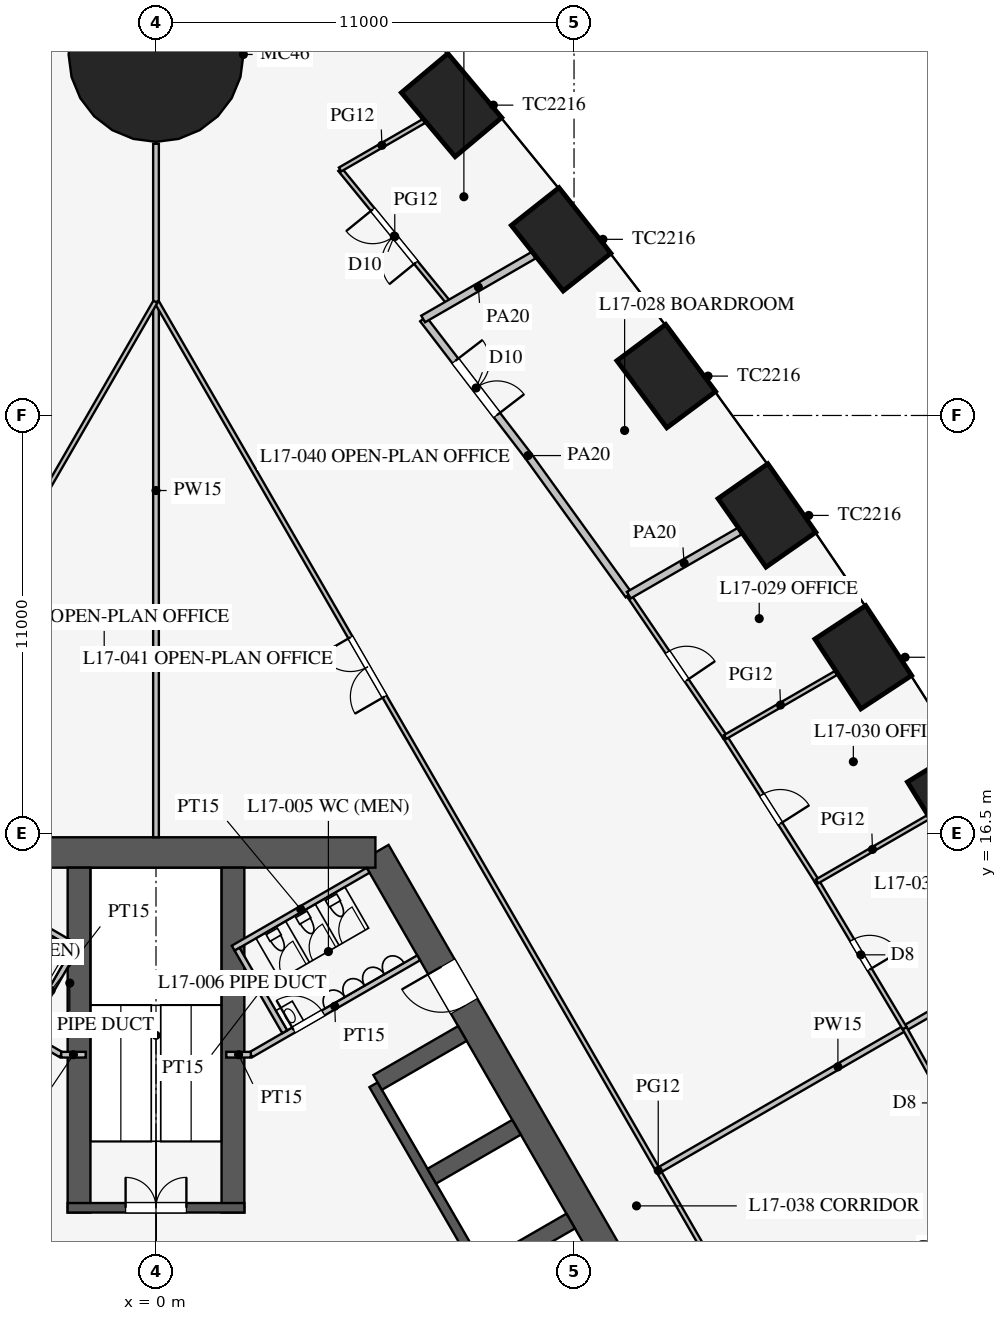
"""IFC4 building model, lengths in metres.
Left out: names, types, materials, properties, quantities, classifications, styles, units other than length and angle.
Written with IfcOpenShell. Run it as: python <this file> out.ifc"""

import sys

from ifc_helpers import new_model, si_unit, direction, frame, frame_2d, origin, origin_2d, place, context, subcontext, project, spatial, rectangle, circle, extrude, element, fill, save


model = new_model("IFC4")
c1 = context("Model", 3, precision=1e-05, world=origin(), true_north=direction((0.0, 1.0)))
c2 = subcontext(c1, "Body", "Model", "MODEL_VIEW")
j1 = project(units=[si_unit("LENGTHUNIT", "METRE"), si_unit("PLANEANGLEUNIT", "RADIAN")], contexts=[c1])
p1 = place(None, origin())
s1 = spatial("IfcSite", under=j1, at=p1, CompositionType="ELEMENT")
p2 = place(p1, origin())
s2 = spatial("IfcBuilding", under=s1, at=p2, CompositionType="ELEMENT")
p3 = place(p2, frame((0.0, 0.0, 75.3)))
s3 = spatial("IfcBuildingStorey", under=s2, at=p3, CompositionType="ELEMENT", Elevation=75.3)
for number, where, z_axis, x_axis in (
    (1, (21.031, 17.339, 0.0), (0.0, 0.0, 1.0), (-0.525, 0.851, 0.0)),
    (2, (18.611, 21.137, 0.0), (0.0, 0.0, 1.0), (-0.549, 0.836, 0.0)),
    (3, (16.076, 24.87, 0.0), (0.0, 0.0, 1.0), (-0.574, 0.819, 0.0)),
    (4, (13.426, 28.536, 0.0), (0.0, 0.0, 1.0), (-0.597, 0.802, 0.0)),
    (5, (10.66, 32.135, 0.0), (0.0, 0.0, 1.0), (-0.62, 0.784, 0.0)),
    (6, (7.776, 35.667, 0.0), (0.0, 0.0, 1.0), (-0.643, 0.766, 0.0)),
):
    element("IfcColumn", number, at=place(p3, frame(where, z_axis=z_axis, x_axis=x_axis)), inside=s3, PredefinedType="COLUMN", context=c2, shape_type="SweptSolid", body=[
        extrude(rectangle(XDim=2.2, YDim=1.6, at=origin_2d()), origin(), (0.0, 0.0, 1.0), 4.2),
    ])
p4 = place(p3, frame((0.0, 37.0, 0.0), z_axis=(0.0, 0.0, 1.0), x_axis=(1.0, 0.0, 0.0)))
e7 = element("IfcColumn", 7, at=p4, inside=s3, PredefinedType="COLUMN", context=c2, shape_type="SweptSolid", body=[
    extrude(circle(Radius=2.3, at=origin_2d()), origin(), (0.0, 0.0, 1.0), 4.2),
])
p5 = place(p3, frame((16.743, -3.0, 0.0), z_axis=(0.0, 0.0, 1.0), x_axis=(-0.500002442456, 0.866023993627, 0.0)))
e8 = element("IfcWall", 8, at=p5, inside=s3, PredefinedType="SHEAR", context=c2, shape_type="SweptSolid", body=[
    extrude(rectangle(XDim=21.939, YDim=0.8, at=frame_2d((10.97, 0.0))), origin(), (0.0, 0.0, 1.0), 4.2),
])
p6 = place(p5, frame((17.27, 0.0, 0.0)))
e9 = element("IfcOpeningElement", 9, at=p6, cuts=e8, PredefinedType="OPENING", context=c2, shape_type="SweptSolid", body=[
    extrude(rectangle(XDim=1.2, YDim=2.1, at=frame_2d((0.6, 1.05))), frame((0.0, 0.41, 0.0), z_axis=(0.0, -1.0, 0.0), x_axis=(1.0, 0.0, 0.0)), (0.0, 0.0, 1.0), 0.82),
])
p7 = place(p5, frame((3.47, 0.0, 0.0)))
e10 = element("IfcOpeningElement", 10, at=p7, cuts=e8, PredefinedType="OPENING", context=c2, shape_type="SweptSolid", body=[
    extrude(rectangle(XDim=1.2, YDim=2.1, at=frame_2d((0.6, 1.05))), frame((0.0, 0.41, 0.0), z_axis=(0.0, -1.0, 0.0), x_axis=(1.0, 0.0, 0.0)), (0.0, 0.0, 1.0), 0.82),
])
p8 = place(p3, frame((5.773, 16.0, 0.0), z_axis=(0.0, 0.0, 1.0), x_axis=(-1.0, 0.0, 0.0)))
e11 = element("IfcWall", 11, at=p8, inside=s3, PredefinedType="SHEAR", context=c2, shape_type="SweptSolid", body=[
    extrude(rectangle(XDim=11.547, YDim=0.8, at=frame_2d((5.773, 0.0))), origin(), (0.0, 0.0, 1.0), 4.2),
])
p9 = place(p3, frame((11.424, 0.014, 0.0), z_axis=(0.0, 0.0, 1.0), x_axis=(-0.500001763848, 0.866024385424, 0.0)))
e12 = element("IfcWall", 12, at=p9, inside=s3, PredefinedType="SHEAR", context=c2, shape_type="SweptSolid", body=[
    extrude(rectangle(XDim=11.4, YDim=0.25, at=frame_2d((5.7, 0.0))), origin(), (0.0, 0.0, 1.0), 4.2),
])
for number, where, z_axis, x_axis in (
    (13, (8.682, 5.012, 0.0), (0.0, 0.0, 1.0), (0.866, 0.5, 0.0)),
    (14, (7.257, 7.481, 0.0), (0.0, 0.0, 1.0), (0.866, 0.5, 0.0)),
):
    element("IfcWall", number, at=place(p3, frame(where, z_axis=z_axis, x_axis=x_axis)), inside=s3, PredefinedType="SHEAR", context=c2, shape_type="SweptSolid", body=[
        extrude(rectangle(XDim=2.575, YDim=0.45, at=frame_2d((1.288, 0.0))), origin(), (0.0, 0.0, 1.0), 4.2),
    ])
p10 = place(p3, frame((5.832, 9.949, 0.0), z_axis=(0.0, 0.0, 1.0), x_axis=(0.866029291668, 0.499993265928, 0.0)))
e15 = element("IfcWall", 15, at=p10, inside=s3, PredefinedType="SHEAR", context=c2, shape_type="SweptSolid", body=[
    extrude(rectangle(XDim=2.575, YDim=0.45, at=frame_2d((1.288, 0.0))), origin(), (0.0, 0.0, 1.0), 4.2),
])
for number, where, z_axis, x_axis in (
    (16, (2.025, 6.525, 0.0), (0.0, 0.0, 1.0), (0.0, 1.0, 0.0)),
    (17, (-2.025, 6.525, 0.0), (0.0, 0.0, 1.0), (0.0, 1.0, 0.0)),
):
    element("IfcWall", number, at=place(p3, frame(where, z_axis=z_axis, x_axis=x_axis)), inside=s3, PredefinedType="SHEAR", context=c2, shape_type="SweptSolid", body=[
        extrude(rectangle(XDim=9.075, YDim=0.6, at=frame_2d((4.538, 0.0))), origin(), (0.0, 0.0, 1.0), 4.2),
    ])
p11 = place(p3, frame((2.325, 6.65, 0.0), z_axis=(0.0, 0.0, 1.0), x_axis=(-1.0, 0.0, 0.0)))
e18 = element("IfcWall", 18, at=p11, inside=s3, PredefinedType="SHEAR", context=c2, shape_type="SweptSolid", body=[
    extrude(rectangle(XDim=4.65, YDim=0.25, at=frame_2d((2.325, 0.0))), origin(), (0.0, 0.0, 1.0), 4.2),
])
p12 = place(p11, frame((1.525, 0.0, 0.0)))
e19 = element("IfcOpeningElement", 19, at=p12, cuts=e18, PredefinedType="OPENING", context=c2, shape_type="SweptSolid", body=[
    extrude(rectangle(XDim=1.6, YDim=2.1, at=frame_2d((0.8, 1.05))), frame((0.0, 0.135, 0.0), z_axis=(0.0, -1.0, 0.0), x_axis=(1.0, 0.0, 0.0)), (0.0, 0.0, 1.0), 0.27),
])
p13 = place(p3, frame((2.495, 10.678, 0.0), z_axis=(0.0, 0.0, 1.0), x_axis=(0.86602216432, 0.500005610874, 0.0)))
e20 = element("IfcWall", 20, at=p13, inside=s3, PredefinedType="PARTITIONING", context=c2, shape_type="SweptSolid", body=[
    extrude(rectangle(XDim=5.1, YDim=0.15, at=frame_2d((2.55, 0.0))), origin(), (0.0, 0.0, 1.0), 4.0),
])
p14 = place(p13, frame((1.3, 0.0, 0.0)))
e21 = element("IfcOpeningElement", 21, at=p14, cuts=e20, PredefinedType="OPENING", context=c2, shape_type="SweptSolid", body=[
    extrude(rectangle(XDim=0.9, YDim=2.1, at=frame_2d((0.45, 1.05))), frame((0.0, 0.085, 0.0), z_axis=(0.0, -1.0, 0.0), x_axis=(1.0, 0.0, 0.0)), (0.0, 0.0, 1.0), 0.17),
])
p15 = place(p3, frame((-2.495, 10.678, 0.0), z_axis=(0.0, 0.0, 1.0), x_axis=(-0.86602216432, 0.500005610874, 0.0)))
e22 = element("IfcWall", 22, at=p15, inside=s3, PredefinedType="PARTITIONING", context=c2, shape_type="SweptSolid", body=[
    extrude(rectangle(XDim=5.1, YDim=0.15, at=frame_2d((2.55, 0.0))), origin(), (0.0, 0.0, 1.0), 4.0),
])
p16 = place(p15, frame((2.6, 0.0, 0.0)))
e23 = element("IfcOpeningElement", 23, at=p16, cuts=e22, PredefinedType="OPENING", context=c2, shape_type="SweptSolid", body=[
    extrude(rectangle(XDim=0.9, YDim=2.1, at=frame_2d((0.45, 1.05))), frame((0.0, 0.085, 0.0), z_axis=(0.0, -1.0, 0.0), x_axis=(1.0, 0.0, 0.0)), (0.0, 0.0, 1.0), 0.17),
])
for number, where, z_axis, x_axis in (
    (24, (2.495, 10.678, 0.0), (0.0, 0.0, 1.0), (-1.0, 0.0, 0.0)),
    (25, (-2.495, 10.678, 0.0), (0.0, 0.0, 1.0), (1.0, 0.0, 0.0)),
):
    element("IfcWall", number, at=place(p3, frame(where, z_axis=z_axis, x_axis=x_axis)), inside=s3, PredefinedType="PARTITIONING", context=c2, shape_type="SweptSolid", body=[
        extrude(rectangle(XDim=0.645, YDim=0.15, at=frame_2d((0.323, 0.0))), origin(), (0.0, 0.0, 1.0), 4.0),
    ])
p17 = place(p3, frame((2.031, 13.482, 0.0), z_axis=(0.0, 0.0, 1.0), x_axis=(0.866050731258, 0.499956128963, 0.0)))
e26 = element("IfcWall", 26, at=p17, inside=s3, PredefinedType="PARTITIONING", context=c2, shape_type="SweptSolid", body=[
    extrude(rectangle(XDim=4.1, YDim=0.15, at=frame_2d((2.05, 0.0))), origin(), (0.0, 0.0, 1.0), 4.0),
])
p18 = place(p3, frame((3.389, 11.281, 0.0), z_axis=(0.0, 0.0, 1.0), x_axis=(-0.499989096993, 0.866031698547, 0.0)))
e27 = element("IfcWall", 27, at=p18, inside=s3, PredefinedType="PARTITIONING", context=c2, shape_type="SweptSolid", body=[
    extrude(rectangle(XDim=2.51, YDim=0.15, at=frame_2d((1.255, 0.0))), origin(), (0.0, 0.0, 1.0), 4.0),
])
p19 = place(p3, frame((-2.031, 13.482, 0.0), z_axis=(0.0, 0.0, 1.0), x_axis=(-0.866050731258, 0.499956128963, 0.0)))
e28 = element("IfcWall", 28, at=p19, inside=s3, PredefinedType="PARTITIONING", context=c2, shape_type="SweptSolid", body=[
    extrude(rectangle(XDim=4.1, YDim=0.15, at=frame_2d((2.05, 0.0))), origin(), (0.0, 0.0, 1.0), 4.0),
])
p20 = place(p3, frame((-3.389, 11.281, 0.0), z_axis=(0.0, 0.0, 1.0), x_axis=(0.499989096993, 0.866031698547, 0.0)))
e29 = element("IfcWall", 29, at=p20, inside=s3, PredefinedType="PARTITIONING", context=c2, shape_type="SweptSolid", body=[
    extrude(rectangle(XDim=2.51, YDim=0.15, at=frame_2d((1.255, 0.0))), origin(), (0.0, 0.0, 1.0), 4.0),
])
p21 = place(p3, frame((0.0, 16.4, 0.0), z_axis=(0.0, 0.0, 1.0), x_axis=(0.0, 1.0, 0.0)))
e30 = element("IfcWall", 30, at=p21, inside=s3, PredefinedType="PARTITIONING", context=c2, shape_type="SweptSolid", body=[
    extrude(rectangle(XDim=18.25, YDim=0.15, at=frame_2d((9.125, 0.0))), origin(), (0.0, 0.0, 1.0), 2.3),
])
p22 = place(p3, frame((13.268, 7.66, 0.0), z_axis=(0.0, 0.0, 1.0), x_axis=(0.866019550038, 0.50001013885, 0.0)))
e31 = element("IfcWall", 31, at=p22, inside=s3, PredefinedType="PARTITIONING", context=c2, shape_type="SweptSolid", body=[
    extrude(rectangle(XDim=10.799, YDim=0.15, at=frame_2d((5.399, 0.0))), origin(), (0.0, 0.0, 1.0), 2.8),
])
p23 = place(p3, frame((26.415, -15.231, 0.0), z_axis=(0.0, 0.0, 1.0), x_axis=(-0.50000091641, 0.866024874695, 0.0)))
e32 = element("IfcWall", 32, at=p23, inside=s3, PredefinedType="PARTITIONING", context=c2, shape_type="SweptSolid", body=[
    extrude(rectangle(XDim=52.796, YDim=0.12, at=frame_2d((26.398, 0.0))), origin(), (0.0, 0.0, 1.0), 2.9),
])
p24 = place(p23, frame((10.2, 0.0, 0.15)))
e33 = element("IfcOpeningElement", 33, at=p24, cuts=e32, PredefinedType="OPENING", context=c2, shape_type="SweptSolid", body=[
    extrude(rectangle(XDim=1.8, YDim=2.1, at=frame_2d((0.9, 1.05))), frame((0.0, 0.07, 0.0), z_axis=(0.0, -1.0, 0.0), x_axis=(1.0, 0.0, 0.0)), (0.0, 0.0, 1.0), 0.14),
])
p25 = place(p23, frame((40.8, 0.0, 0.15)))
e34 = element("IfcOpeningElement", 34, at=p25, cuts=e32, PredefinedType="OPENING", context=c2, shape_type="SweptSolid", body=[
    extrude(rectangle(XDim=1.8, YDim=2.1, at=frame_2d((0.9, 1.05))), frame((0.0, 0.07, 0.0), z_axis=(0.0, -1.0, 0.0), x_axis=(1.0, 0.0, 0.0)), (0.0, 0.0, 1.0), 0.14),
])
p26 = place(p3, frame((19.701, 11.374, 0.0), z_axis=(0.0, 0.0, 1.0), x_axis=(-0.512483962191, 0.858696796604, 0.0)))
e35 = element("IfcWall", 35, at=p26, inside=s3, PredefinedType="PARTITIONING", context=c2, shape_type="SweptSolid", body=[
    extrude(rectangle(XDim=4.5, YDim=0.12, at=frame_2d((2.25, 0.0))), origin(), (0.0, 0.0, 1.0), 2.9),
])
p27 = place(p26, frame((1.8, 0.0, 0.15)))
e36 = element("IfcOpeningElement", 36, at=p27, cuts=e35, PredefinedType="OPENING", context=c2, shape_type="SweptSolid", body=[
    extrude(rectangle(XDim=0.9, YDim=2.1, at=frame_2d((0.45, 1.05))), frame((0.0, 0.07, 0.0), z_axis=(0.0, -1.0, 0.0), x_axis=(1.0, 0.0, 0.0)), (0.0, 0.0, 1.0), 0.14),
])
p28 = place(p3, frame((12.441, 22.771, 0.0), z_axis=(0.0, 0.0, 1.0), x_axis=(-0.585376255171, 0.810761765183, 0.0)))
e37 = element("IfcWall", 37, at=p28, inside=s3, PredefinedType="PARTITIONING", context=c2, shape_type="SweptSolid", body=[
    extrude(rectangle(XDim=4.523, YDim=0.2, at=frame_2d((2.262, 0.0))), origin(), (0.0, 0.0, 1.0), 2.9),
])
p29 = place(p3, frame((9.793, 26.439, 0.0), z_axis=(0.0, 0.0, 1.0), x_axis=(-0.608784932975, 0.79333530451, 0.0)))
e38 = element("IfcWall", 38, at=p29, inside=s3, PredefinedType="PARTITIONING", context=c2, shape_type="SweptSolid", body=[
    extrude(rectangle(XDim=4.539, YDim=0.2, at=frame_2d((2.27, 0.0))), origin(), (0.0, 0.0, 1.0), 2.9),
])
p30 = place(p29, frame((1.35, 0.0, 0.15)))
e39 = element("IfcOpeningElement", 39, at=p30, cuts=e38, PredefinedType="OPENING", context=c2, shape_type="SweptSolid", body=[
    extrude(rectangle(XDim=1.8, YDim=2.1, at=frame_2d((0.9, 1.05))), frame((0.0, 0.11, 0.0), z_axis=(0.0, -1.0, 0.0), x_axis=(1.0, 0.0, 0.0)), (0.0, 0.0, 1.0), 0.22),
])
p31 = place(p3, frame((7.723, 30.439, 0.0), z_axis=(0.0, 0.0, 1.0), x_axis=(-0.631807650035, 0.775125211406, 0.0)))
e40 = element("IfcWall", 40, at=p31, inside=s3, PredefinedType="PARTITIONING", context=c2, shape_type="SweptSolid", body=[
    extrude(rectangle(XDim=4.559, YDim=0.12, at=frame_2d((2.279, 0.0))), origin(), (0.0, 0.0, 1.0), 2.9),
])
p32 = place(p31, frame((1.4, 0.0, 0.15)))
e41 = element("IfcOpeningElement", 41, at=p32, cuts=e40, PredefinedType="OPENING", context=c2, shape_type="SweptSolid", body=[
    extrude(rectangle(XDim=1.8, YDim=2.1, at=frame_2d((0.9, 1.05))), frame((0.0, 0.07, 0.0), z_axis=(0.0, -1.0, 0.0), x_axis=(1.0, 0.0, 0.0)), (0.0, 0.0, 1.0), 0.14),
])
p33 = place(p3, frame((17.395, 15.239, 0.0), z_axis=(0.0, 0.0, 1.0), x_axis=(-0.537243691336, 0.843427066272, 0.0)))
e42 = element("IfcWall", 42, at=p33, inside=s3, PredefinedType="PARTITIONING", context=c2, shape_type="SweptSolid", body=[
    extrude(rectangle(XDim=4.504, YDim=0.12, at=frame_2d((2.252, 0.0))), origin(), (0.0, 0.0, 1.0), 2.9),
])
p34 = place(p33, frame((1.8, 0.0, 0.15)))
e43 = element("IfcOpeningElement", 43, at=p34, cuts=e42, PredefinedType="OPENING", context=c2, shape_type="SweptSolid", body=[
    extrude(rectangle(XDim=0.9, YDim=2.1, at=frame_2d((0.45, 1.05))), frame((0.0, 0.07, 0.0), z_axis=(0.0, -1.0, 0.0), x_axis=(1.0, 0.0, 0.0)), (0.0, 0.0, 1.0), 0.14),
])
p35 = place(p3, frame((14.975, 19.038, 0.0), z_axis=(0.0, 0.0, 1.0), x_axis=(-0.561512004239, 0.827468591002, 0.0)))
e44 = element("IfcWall", 44, at=p35, inside=s3, PredefinedType="PARTITIONING", context=c2, shape_type="SweptSolid", body=[
    extrude(rectangle(XDim=4.512, YDim=0.12, at=frame_2d((2.256, 0.0))), origin(), (0.0, 0.0, 1.0), 2.9),
])
p36 = place(p35, frame((1.8, 0.0, 0.15)))
e45 = element("IfcOpeningElement", 45, at=p36, cuts=e44, PredefinedType="OPENING", context=c2, shape_type="SweptSolid", body=[
    extrude(rectangle(XDim=0.9, YDim=2.1, at=frame_2d((0.45, 1.05))), frame((0.0, 0.07, 0.0), z_axis=(0.0, -1.0, 0.0), x_axis=(1.0, 0.0, 0.0)), (0.0, 0.0, 1.0), 0.14),
])
p37 = place(p3, frame((21.895, 7.445, 0.0), z_axis=(0.0, 0.0, 1.0), x_axis=(-0.487415216275, 0.87317031955, 0.0)))
e46 = element("IfcWall", 46, at=p37, inside=s3, PredefinedType="PARTITIONING", context=c2, shape_type="SweptSolid", body=[
    extrude(rectangle(XDim=4.5, YDim=0.12, at=frame_2d((2.25, 0.0))), origin(), (0.0, 0.0, 1.0), 2.9),
])
p38 = place(p37, frame((1.8, 0.0, 0.15)))
e47 = element("IfcOpeningElement", 47, at=p38, cuts=e46, PredefinedType="OPENING", context=c2, shape_type="SweptSolid", body=[
    extrude(rectangle(XDim=0.9, YDim=2.1, at=frame_2d((0.45, 1.05))), frame((0.0, 0.07, 0.0), z_axis=(0.0, -1.0, 0.0), x_axis=(1.0, 0.0, 0.0)), (0.0, 0.0, 1.0), 0.14),
])
p39 = place(p3, frame((12.441, 22.771, 0.0), z_axis=(0.0, 0.0, 1.0), x_axis=(0.865992196602, 0.500057512117, 0.0)))
e48 = element("IfcWall", 48, at=p39, inside=s3, PredefinedType="PARTITIONING", context=c2, shape_type="SweptSolid", body=[
    extrude(rectangle(XDim=3.364, YDim=0.2, at=frame_2d((1.682, 0.0))), origin(), (0.0, 0.0, 1.0), 2.6),
])
p40 = place(p3, frame((7.03, 30.04, 0.0), z_axis=(0.0, 0.0, 1.0), x_axis=(0.866038859646, 0.49997669304, 0.0)))
e49 = element("IfcWall", 49, at=p40, inside=s3, PredefinedType="PARTITIONING", context=c2, shape_type="SweptSolid", body=[
    extrude(rectangle(XDim=3.353, YDim=0.2, at=frame_2d((1.676, 0.0))), origin(), (0.0, 0.0, 1.0), 2.8),
])
p41 = place(p3, frame((4.843, 33.973, 0.0), z_axis=(0.0, 0.0, 1.0), x_axis=(0.866014639343, 0.500018644096, 0.0)))
e50 = element("IfcWall", 50, at=p41, inside=s3, PredefinedType="PARTITIONING", context=c2, shape_type="SweptSolid", body=[
    extrude(rectangle(XDim=2.545, YDim=0.12, at=frame_2d((1.272, 0.0))), origin(), (0.0, 0.0, 1.0), 2.9),
])
p42 = place(p3, frame((17.395, 15.239, 0.0), z_axis=(0.0, 0.0, 1.0), x_axis=(0.865991297194, 0.500059069696, 0.0)))
e51 = element("IfcWall", 51, at=p42, inside=s3, PredefinedType="PARTITIONING", context=c2, shape_type="SweptSolid", body=[
    extrude(rectangle(XDim=3.369, YDim=0.12, at=frame_2d((1.685, 0.0))), origin(), (0.0, 0.0, 1.0), 2.8),
])
p43 = place(p3, frame((14.975, 19.038, 0.0), z_axis=(0.0, 0.0, 1.0), x_axis=(0.866039498442, 0.499975586543, 0.0)))
e52 = element("IfcWall", 52, at=p43, inside=s3, PredefinedType="PARTITIONING", context=c2, shape_type="SweptSolid", body=[
    extrude(rectangle(XDim=3.367, YDim=0.12, at=frame_2d((1.684, 0.0))), origin(), (0.0, 0.0, 1.0), 2.8),
])
p44 = place(p3, frame((-0.016, 30.491, 0.0), z_axis=(0.0, 0.0, 1.0), x_axis=(-0.50000091641, -0.866024874695, 0.0)))
e53 = element("IfcWall", 53, at=p44, inside=s3, PredefinedType="PARTITIONING", context=c2, shape_type="SweptSolid", body=[
    extrude(rectangle(XDim=52.796, YDim=0.12, at=frame_2d((26.398, 0.0))), origin(), (0.0, 0.0, 1.0), 2.9),
])
p45 = place(p44, frame((10.2, 0.0, 0.15)))
e54 = element("IfcOpeningElement", 54, at=p45, cuts=e53, PredefinedType="OPENING", context=c2, shape_type="SweptSolid", body=[
    extrude(rectangle(XDim=1.8, YDim=2.1, at=frame_2d((0.9, 1.05))), frame((0.0, 0.07, 0.0), z_axis=(0.0, -1.0, 0.0), x_axis=(1.0, 0.0, 0.0)), (0.0, 0.0, 1.0), 0.14),
])
p46 = place(p44, frame((40.8, 0.0, 0.15)))
e55 = element("IfcOpeningElement", 55, at=p46, cuts=e53, PredefinedType="OPENING", context=c2, shape_type="SweptSolid", body=[
    extrude(rectangle(XDim=1.8, YDim=2.1, at=frame_2d((0.9, 1.05))), frame((0.0, 0.07, 0.0), z_axis=(0.0, -1.0, 0.0), x_axis=(1.0, 0.0, 0.0)), (0.0, 0.0, 1.0), 0.14),
])
p47 = place(p14, origin())
e56 = element("IfcDoor", 56, at=p47, inside=s3, OperationType="SINGLE_SWING_LEFT", PredefinedType="DOOR", context=c2, shape_type="SweptSolid", body=[
    extrude(rectangle(XDim=0.9, YDim=2.1, at=frame_2d((0.45, 1.05))), frame((0.0, 0.025, 0.0), z_axis=(0.0, -1.0, 0.0), x_axis=(1.0, 0.0, 0.0)), (0.0, 0.0, 1.0), 0.05),
])
fill(e21, e56)
p48 = place(p12, frame((1.6, 0.0, 0.0), z_axis=(0.0, 0.0, 1.0), x_axis=(-1.0, 0.0, 0.0)))
e57 = element("IfcDoor", 57, at=p48, inside=s3, OperationType="DOUBLE_DOOR_SINGLE_SWING", PredefinedType="DOOR", context=c2, shape_type="SweptSolid", body=[
    extrude(rectangle(XDim=1.6, YDim=2.1, at=frame_2d((0.8, 1.05))), frame((0.0, 0.025, 0.0), z_axis=(0.0, -1.0, 0.0), x_axis=(1.0, 0.0, 0.0)), (0.0, 0.0, 1.0), 0.05),
])
fill(e19, e57)
p49 = place(p6, origin())
e58 = element("IfcDoor", 58, at=p49, inside=s3, OperationType="SINGLE_SWING_RIGHT", PredefinedType="DOOR", context=c2, shape_type="SweptSolid", body=[
    extrude(rectangle(XDim=1.2, YDim=2.1, at=frame_2d((0.6, 1.05))), frame((0.0, 0.025, 0.0), z_axis=(0.0, -1.0, 0.0), x_axis=(1.0, 0.0, 0.0)), (0.0, 0.0, 1.0), 0.05),
])
fill(e9, e58)
p50 = place(p32, origin())
e59 = element("IfcDoor", 59, at=p50, inside=s3, OperationType="DOUBLE_DOOR_SINGLE_SWING", PredefinedType="DOOR", context=c2, shape_type="SweptSolid", body=[
    extrude(rectangle(XDim=1.8, YDim=2.1, at=frame_2d((0.9, 1.05))), frame((0.0, 0.025, 0.0), z_axis=(0.0, -1.0, 0.0), x_axis=(1.0, 0.0, 0.0)), (0.0, 0.0, 1.0), 0.05),
])
fill(e41, e59)
p51 = place(p30, frame((1.8, 0.0, 0.0), z_axis=(0.0, 0.0, 1.0), x_axis=(-1.0, 0.0, 0.0)))
e60 = element("IfcDoor", 60, at=p51, inside=s3, OperationType="DOUBLE_DOOR_SINGLE_SWING", PredefinedType="DOOR", context=c2, shape_type="SweptSolid", body=[
    extrude(rectangle(XDim=1.8, YDim=2.1, at=frame_2d((0.9, 1.05))), frame((0.0, 0.025, 0.0), z_axis=(0.0, -1.0, 0.0), x_axis=(1.0, 0.0, 0.0)), (0.0, 0.0, 1.0), 0.05),
])
fill(e39, e60)
p52 = place(p36, frame((0.9, 0.0, 0.0), z_axis=(0.0, 0.0, 1.0), x_axis=(-1.0, 0.0, 0.0)))
e61 = element("IfcDoor", 61, at=p52, inside=s3, OperationType="SINGLE_SWING_RIGHT", PredefinedType="DOOR", context=c2, shape_type="SweptSolid", body=[
    extrude(rectangle(XDim=0.9, YDim=2.1, at=frame_2d((0.45, 1.05))), frame((0.0, 0.025, 0.0), z_axis=(0.0, -1.0, 0.0), x_axis=(1.0, 0.0, 0.0)), (0.0, 0.0, 1.0), 0.05),
])
fill(e45, e61)
p53 = place(p34, frame((0.9, 0.0, 0.0), z_axis=(0.0, 0.0, 1.0), x_axis=(-1.0, 0.0, 0.0)))
e62 = element("IfcDoor", 62, at=p53, inside=s3, OperationType="SINGLE_SWING_RIGHT", PredefinedType="DOOR", context=c2, shape_type="SweptSolid", body=[
    extrude(rectangle(XDim=0.9, YDim=2.1, at=frame_2d((0.45, 1.05))), frame((0.0, 0.025, 0.0), z_axis=(0.0, -1.0, 0.0), x_axis=(1.0, 0.0, 0.0)), (0.0, 0.0, 1.0), 0.05),
])
fill(e43, e62)
p54 = place(p27, frame((0.9, 0.0, 0.0), z_axis=(0.0, 0.0, 1.0), x_axis=(-1.0, 0.0, 0.0)))
e63 = element("IfcDoor", 63, at=p54, inside=s3, OperationType="SINGLE_SWING_RIGHT", PredefinedType="DOOR", context=c2, shape_type="SweptSolid", body=[
    extrude(rectangle(XDim=0.9, YDim=2.1, at=frame_2d((0.45, 1.05))), frame((0.0, 0.025, 0.0), z_axis=(0.0, -1.0, 0.0), x_axis=(1.0, 0.0, 0.0)), (0.0, 0.0, 1.0), 0.05),
])
fill(e36, e63)
p55 = place(p25, origin())
e64 = element("IfcDoor", 64, at=p55, inside=s3, OperationType="DOUBLE_DOOR_SINGLE_SWING", PredefinedType="DOOR", context=c2, shape_type="SweptSolid", body=[
    extrude(rectangle(XDim=1.8, YDim=2.1, at=frame_2d((0.9, 1.05))), frame((0.0, 0.025, 0.0), z_axis=(0.0, -1.0, 0.0), x_axis=(1.0, 0.0, 0.0)), (0.0, 0.0, 1.0), 0.05),
])
fill(e34, e64)
save(model, sys.argv[1])
